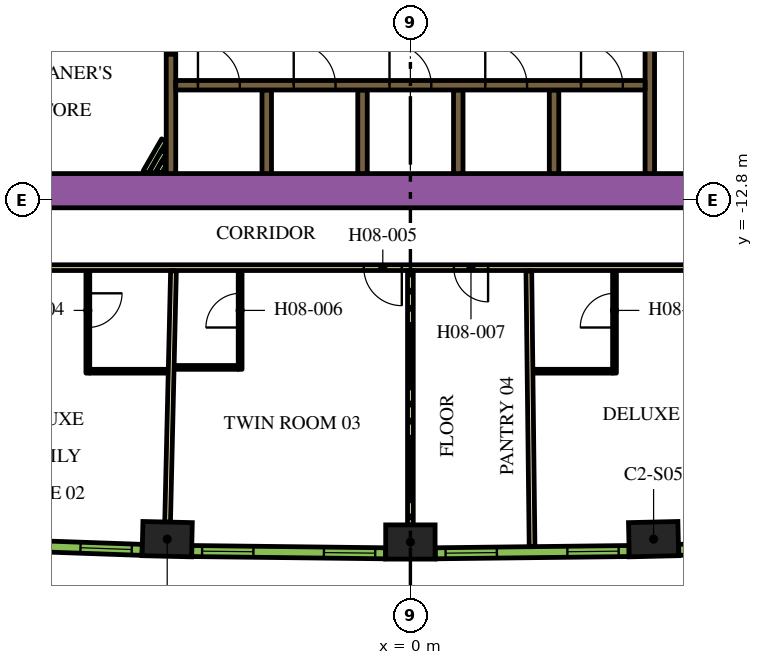
"""IFC4 building model, lengths in metres.
Left out: names, types, materials, properties, quantities, classifications, styles, units other than length and angle.
Written with IfcOpenShell. Run it as: python <this file> out.ifc"""

import sys

from ifc_helpers import new_model, si_unit, direction, frame, frame_2d, origin, origin_2d, place, context, subcontext, project, spatial, rectangle, extrude, element, fill, save


model = new_model("IFC4")
c1 = context("Model", 3, precision=1e-05, world=origin(), true_north=direction((0.0, 1.0)))
c2 = subcontext(c1, "Body", "Model", "MODEL_VIEW")
j1 = project(units=[si_unit("LENGTHUNIT", "METRE"), si_unit("PLANEANGLEUNIT", "RADIAN")], contexts=[c1])
p1 = place(None, origin())
s1 = spatial("IfcSite", under=j1, at=p1, CompositionType="ELEMENT")
p2 = place(p1, origin())
s2 = spatial("IfcBuilding", under=s1, at=p2, CompositionType="ELEMENT")
p3 = place(p2, frame((0.0, 0.0, 107.1)))
s3 = spatial("IfcBuildingStorey", under=s2, at=p3, CompositionType="ELEMENT", Elevation=107.1)
for number, where, z_axis, x_axis in (
    (1, (-6.399, -21.719, 0.0), (0.0, 0.0, 1.0), (1.0, -0.023, 0.0)),
    (2, (0.0, -21.794, 0.0), (0.0, 0.0, 1.0), (1.0, 0.0, 0.0)),
    (3, (6.399, -21.719, 0.0), (0.0, 0.0, 1.0), (1.0, 0.023, 0.0)),
):
    element("IfcColumn", number, at=place(p3, frame(where, z_axis=z_axis, x_axis=x_axis)), inside=s3, PredefinedType="COLUMN", context=c2, shape_type="SweptSolid", body=[
        extrude(rectangle(XDim=1.3, YDim=0.9, at=origin_2d()), origin(), (0.0, 0.0, 1.0), 3.9),
    ])
p4 = place(p3, frame((-12.019, -12.55, 0.0), z_axis=(0.0, 0.0, 1.0), x_axis=(1.0, 0.0, 0.0)))
e4 = element("IfcWall", 4, at=p4, inside=s3, PredefinedType="SOLIDWALL", context=c2, shape_type="SweptSolid", body=[
    extrude(rectangle(XDim=21.63, YDim=0.9, at=frame_2d((10.815, 0.0))), origin(), (0.0, 0.0, 1.0), 3.9),
])
p5 = place(p3, frame((12.84, -9.261, 0.0), z_axis=(0.0, 0.0, 1.0), x_axis=(-0.866013990052, 0.500019768644, 0.0)))
e5 = element("IfcWall", 5, at=p5, inside=s3, PredefinedType="SOLIDWALL", context=c2, shape_type="SweptSolid", body=[
    extrude(rectangle(XDim=6.8, YDim=0.25, at=frame_2d((3.4, 0.0))), origin(), (0.0, 0.0, 1.0), 3.9),
])
p6 = place(p3, frame((-12.84, -9.261, 0.0), z_axis=(0.0, 0.0, 1.0), x_axis=(0.866016039709, 0.500016218704, 0.0)))
e6 = element("IfcWall", 6, at=p6, inside=s3, PredefinedType="SOLIDWALL", context=c2, shape_type="SweptSolid", body=[
    extrude(rectangle(XDim=7.05, YDim=0.25, at=frame_2d((3.525, 0.0))), origin(), (0.0, 0.0, 1.0), 3.9),
])
p7 = place(p3, frame((-3.78, -12.1, 0.0), z_axis=(0.0, 0.0, 1.0), x_axis=(0.0, 1.0, 0.0)))
e7 = element("IfcWall", 7, at=p7, inside=s3, PredefinedType="SOLIDWALL", context=c2, shape_type="SweptSolid", body=[
    extrude(rectangle(XDim=2.2, YDim=0.25, at=frame_2d((1.1, 0.0))), origin(), (0.0, 0.0, 1.0), 3.9),
])
p8 = place(p3, frame((-6.3, -12.1, 0.0), z_axis=(0.0, 0.0, 1.0), x_axis=(0.0, 1.0, 0.0)))
e8 = element("IfcWall", 8, at=p8, inside=s3, PredefinedType="SOLIDWALL", context=c2, shape_type="SweptSolid", body=[
    extrude(rectangle(XDim=3.146, YDim=0.25, at=frame_2d((1.573, 0.0))), origin(), (0.0, 0.0, 1.0), 3.9),
])
p9 = place(p3, frame((6.3, -8.67, 0.0), z_axis=(0.0, 0.0, 1.0), x_axis=(0.0, -1.0, 0.0)))
e9 = element("IfcWall", 9, at=p9, inside=s3, PredefinedType="SOLIDWALL", context=c2, shape_type="SweptSolid", body=[
    extrude(rectangle(XDim=3.43, YDim=0.25, at=frame_2d((1.715, 0.0))), origin(), (0.0, 0.0, 1.0), 3.9),
])
for number, where, z_axis, x_axis in (
    (10, (3.78, -12.1, 0.0), (0.0, 0.0, 1.0), (0.0, 1.0, 0.0)),
    (11, (1.26, -12.1, 0.0), (0.0, 0.0, 1.0), (0.0, 1.0, 0.0)),
    (12, (-1.26, -12.1, 0.0), (0.0, 0.0, 1.0), (0.0, 1.0, 0.0)),
):
    element("IfcWall", number, at=place(p3, frame(where, z_axis=z_axis, x_axis=x_axis)), inside=s3, PredefinedType="SOLIDWALL", context=c2, shape_type="SweptSolid", body=[
        extrude(rectangle(XDim=2.2, YDim=0.25, at=frame_2d((1.1, 0.0))), origin(), (0.0, 0.0, 1.0), 3.9),
    ])
p10 = place(p3, frame((-6.968, -12.068, 0.0), z_axis=(0.0, 0.0, 1.0), x_axis=(0.49998975084, 0.866031321059, 0.0)))
e13 = element("IfcWall", 13, at=p10, inside=s3, PredefinedType="PARTITIONING", context=c2, shape_type="SweptSolid", body=[
    extrude(rectangle(XDim=0.975, YDim=0.15, at=frame_2d((0.488, 0.0))), origin(), (0.0, 0.0, 1.0), 2.75),
])
p11 = place(p3, frame((-6.794, -12.068, 0.0), z_axis=(0.0, 0.0, 1.0), x_axis=(0.49985693963, 0.866107983974, 0.0)))
e14 = element("IfcWall", 14, at=p11, inside=s3, PredefinedType="PARTITIONING", context=c2, shape_type="SweptSolid", body=[
    extrude(rectangle(XDim=0.629, YDim=0.15, at=frame_2d((0.314, 0.0))), origin(), (0.0, 0.0, 1.0), 2.75),
])
p12 = place(p3, frame((-6.621, -12.068, 0.0), z_axis=(0.0, 0.0, 1.0), x_axis=(0.500046963369, 0.865998287773, 0.0)))
e15 = element("IfcWall", 15, at=p12, inside=s3, PredefinedType="PARTITIONING", context=c2, shape_type="SweptSolid", body=[
    extrude(rectangle(XDim=0.282, YDim=0.15, at=frame_2d((0.141, 0.0))), origin(), (0.0, 0.0, 1.0), 2.75),
])
p13 = place(p3, frame((-6.175, -9.775, 0.0), z_axis=(0.0, 0.0, 1.0), x_axis=(1.0, 0.0, 0.0)))
e16 = element("IfcWall", 16, at=p13, inside=s3, PredefinedType="SOLIDWALL", context=c2, shape_type="SweptSolid", body=[
    extrude(rectangle(XDim=12.35, YDim=0.25, at=frame_2d((6.175, 0.0))), origin(), (0.0, 0.0, 1.0), 3.9),
])
p14 = place(p13, frame((0.585, 0.0, 0.0)))
e17 = element("IfcOpeningElement", 17, at=p14, cuts=e16, PredefinedType="OPENING", context=c2, shape_type="SweptSolid", body=[
    extrude(rectangle(XDim=1.1, YDim=2.1, at=frame_2d((0.55, 1.05))), frame((0.0, 0.135, 0.0), z_axis=(0.0, -1.0, 0.0), x_axis=(1.0, 0.0, 0.0)), (0.0, 0.0, 1.0), 0.27),
])
p15 = place(p13, frame((3.105, 0.0, 0.0)))
e18 = element("IfcOpeningElement", 18, at=p15, cuts=e16, PredefinedType="OPENING", context=c2, shape_type="SweptSolid", body=[
    extrude(rectangle(XDim=1.1, YDim=2.1, at=frame_2d((0.55, 1.05))), frame((0.0, 0.135, 0.0), z_axis=(0.0, -1.0, 0.0), x_axis=(1.0, 0.0, 0.0)), (0.0, 0.0, 1.0), 0.27),
])
p16 = place(p13, frame((5.625, 0.0, 0.0)))
e19 = element("IfcOpeningElement", 19, at=p16, cuts=e16, PredefinedType="OPENING", context=c2, shape_type="SweptSolid", body=[
    extrude(rectangle(XDim=1.1, YDim=2.1, at=frame_2d((0.55, 1.05))), frame((0.0, 0.135, 0.0), z_axis=(0.0, -1.0, 0.0), x_axis=(1.0, 0.0, 0.0)), (0.0, 0.0, 1.0), 0.27),
])
p17 = place(p13, frame((8.145, 0.0, 0.0)))
e20 = element("IfcOpeningElement", 20, at=p17, cuts=e16, PredefinedType="OPENING", context=c2, shape_type="SweptSolid", body=[
    extrude(rectangle(XDim=1.1, YDim=2.1, at=frame_2d((0.55, 1.05))), frame((0.0, 0.135, 0.0), z_axis=(0.0, -1.0, 0.0), x_axis=(1.0, 0.0, 0.0)), (0.0, 0.0, 1.0), 0.27),
])
p18 = place(p13, frame((10.665, 0.0, 0.0)))
e21 = element("IfcOpeningElement", 21, at=p18, cuts=e16, PredefinedType="OPENING", context=c2, shape_type="SweptSolid", body=[
    extrude(rectangle(XDim=1.1, YDim=2.1, at=frame_2d((0.55, 1.05))), frame((0.0, 0.135, 0.0), z_axis=(0.0, -1.0, 0.0), x_axis=(1.0, 0.0, 0.0)), (0.0, 0.0, 1.0), 0.27),
])
p19 = place(p3, frame((-6.3, -7.154, 0.0), z_axis=(0.0, 0.0, 1.0), x_axis=(0.0, -1.0, 0.0)))
e22 = element("IfcWall", 22, at=p19, inside=s3, PredefinedType="SOLIDWALL", context=c2, shape_type="SweptSolid", body=[
    extrude(rectangle(XDim=1.8, YDim=0.25, at=frame_2d((0.9, 0.0))), origin(), (0.0, 0.0, 1.0), 3.9),
])
p20 = place(p19, frame((0.45, 0.0, 0.0)))
e23 = element("IfcOpeningElement", 23, at=p20, cuts=e22, PredefinedType="OPENING", context=c2, shape_type="SweptSolid", body=[
    extrude(rectangle(XDim=0.9, YDim=2.1, at=frame_2d((0.45, 1.05))), frame((0.0, 0.135, 0.0), z_axis=(0.0, -1.0, 0.0), x_axis=(1.0, 0.0, 0.0)), (0.0, 0.0, 1.0), 0.27),
])
p21 = place(p3, frame((12.918, -14.575, 0.0), z_axis=(0.0, 0.0, 1.0), x_axis=(-1.0, 0.0, 0.0)))
e24 = element("IfcWall", 24, at=p21, inside=s3, PredefinedType="PARTITIONING", context=c2, shape_type="SweptSolid", body=[
    extrude(rectangle(XDim=25.766, YDim=0.15, at=frame_2d((12.883, 0.0))), origin(), (0.0, 0.0, 1.0), 2.75),
])
p22 = place(p21, frame((24.586, 0.0, 0.0)))
e25 = element("IfcOpeningElement", 25, at=p22, cuts=e24, PredefinedType="OPENING", context=c2, shape_type="SweptSolid", body=[
    extrude(rectangle(XDim=1.0, YDim=2.1, at=frame_2d((0.5, 1.05))), frame((0.0, 0.085, 0.0), z_axis=(0.0, -1.0, 0.0), x_axis=(1.0, 0.0, 0.0)), (0.0, 0.0, 1.0), 0.17),
])
p23 = place(p21, frame((13.144, 0.0, 0.0)))
e26 = element("IfcOpeningElement", 26, at=p23, cuts=e24, PredefinedType="OPENING", context=c2, shape_type="SweptSolid", body=[
    extrude(rectangle(XDim=1.0, YDim=2.1, at=frame_2d((0.5, 1.05))), frame((0.0, 0.085, 0.0), z_axis=(0.0, -1.0, 0.0), x_axis=(1.0, 0.0, 0.0)), (0.0, 0.0, 1.0), 0.17),
])
p24 = place(p21, frame((10.874, 0.0, 0.0)))
e27 = element("IfcOpeningElement", 27, at=p24, cuts=e24, PredefinedType="OPENING", context=c2, shape_type="SweptSolid", body=[
    extrude(rectangle(XDim=0.9, YDim=2.1, at=frame_2d((0.45, 1.05))), frame((0.0, 0.085, 0.0), z_axis=(0.0, -1.0, 0.0), x_axis=(1.0, 0.0, 0.0)), (0.0, 0.0, 1.0), 0.17),
])
p25 = place(p21, frame((0.596, 0.0, 0.0)))
e28 = element("IfcOpeningElement", 28, at=p25, cuts=e24, PredefinedType="OPENING", context=c2, shape_type="SweptSolid", body=[
    extrude(rectangle(XDim=1.0, YDim=2.1, at=frame_2d((0.5, 1.05))), frame((0.0, 0.085, 0.0), z_axis=(0.0, -1.0, 0.0), x_axis=(1.0, 0.0, 0.0)), (0.0, 0.0, 1.0), 0.17),
])
p26 = place(p3, frame((-6.389, -21.269, 0.0), z_axis=(0.0, 0.0, 1.0), x_axis=(0.023377429176, 0.999726710559, 0.0)))
e29 = element("IfcWall", 29, at=p26, inside=s3, PredefinedType="PARTITIONING", context=c2, shape_type="SweptSolid", body=[
    extrude(rectangle(XDim=6.611, YDim=0.15, at=frame_2d((3.305, 0.0))), origin(), (0.0, 0.0, 1.0), 2.75),
])
p27 = place(p3, frame((0.0, -21.344, 0.0), z_axis=(0.0, 0.0, 1.0), x_axis=(0.0, 1.0, 0.0)))
e30 = element("IfcWall", 30, at=p27, inside=s3, PredefinedType="PARTITIONING", context=c2, shape_type="SweptSolid", body=[
    extrude(rectangle(XDim=6.694, YDim=0.15, at=frame_2d((3.347, 0.0))), origin(), (0.0, 0.0, 1.0), 2.75),
])
p28 = place(p3, frame((3.202, -21.916, 0.0), z_axis=(0.0, 0.0, 1.0), x_axis=(-0.011707696285, 0.999931462575, 0.0)))
e31 = element("IfcWall", 31, at=p28, inside=s3, PredefinedType="PARTITIONING", context=c2, shape_type="SweptSolid", body=[
    extrude(rectangle(XDim=7.257, YDim=0.15, at=frame_2d((3.628, 0.0))), origin(), (0.0, 0.0, 1.0), 2.75),
])
p29 = place(p3, frame((-8.488, -14.65, 0.0), z_axis=(0.0, 0.0, 1.0), x_axis=(0.0, -1.0, 0.0)))
e32 = element("IfcWall", 32, at=p29, inside=s3, PredefinedType="PARTITIONING", context=c2, shape_type="SweptSolid", body=[
    extrude(rectangle(XDim=2.7, YDim=0.1, at=frame_2d((1.35, 0.0))), origin(), (0.0, 0.0, 1.0), 2.75),
])
p30 = place(p29, frame((0.6, 0.0, 0.0)))
e33 = element("IfcOpeningElement", 33, at=p30, cuts=e32, PredefinedType="OPENING", context=c2, shape_type="SweptSolid", body=[
    extrude(rectangle(XDim=0.9, YDim=2.1, at=frame_2d((0.45, 1.05))), frame((0.0, 0.06, 0.0), z_axis=(0.0, -1.0, 0.0), x_axis=(1.0, 0.0, 0.0)), (0.0, 0.0, 1.0), 0.12),
])
p31 = place(p3, frame((-8.438, -17.3, 0.0), z_axis=(0.0, 0.0, 1.0), x_axis=(1.0, 0.0, 0.0)))
e34 = element("IfcWall", 34, at=p31, inside=s3, PredefinedType="PARTITIONING", context=c2, shape_type="SweptSolid", body=[
    extrude(rectangle(XDim=2.06, YDim=0.1, at=frame_2d((1.03, 0.0))), origin(), (0.0, 0.0, 1.0), 2.75),
])
p32 = place(p3, frame((-4.48, -17.25, 0.0), z_axis=(0.0, 0.0, 1.0), x_axis=(0.0, 1.0, 0.0)))
e35 = element("IfcWall", 35, at=p32, inside=s3, PredefinedType="PARTITIONING", context=c2, shape_type="SweptSolid", body=[
    extrude(rectangle(XDim=2.6, YDim=0.1, at=frame_2d((1.3, 0.0))), origin(), (0.0, 0.0, 1.0), 2.75),
])
p33 = place(p32, frame((1.1, 0.0, 0.0)))
e36 = element("IfcOpeningElement", 36, at=p33, cuts=e35, PredefinedType="OPENING", context=c2, shape_type="SweptSolid", body=[
    extrude(rectangle(XDim=0.9, YDim=2.1, at=frame_2d((0.45, 1.05))), frame((0.0, 0.06, 0.0), z_axis=(0.0, -1.0, 0.0), x_axis=(1.0, 0.0, 0.0)), (0.0, 0.0, 1.0), 0.12),
])
p34 = place(p3, frame((-4.53, -17.2, 0.0), z_axis=(0.0, 0.0, 1.0), x_axis=(-1.0, 0.0, 0.0)))
e37 = element("IfcWall", 37, at=p34, inside=s3, PredefinedType="PARTITIONING", context=c2, shape_type="SweptSolid", body=[
    extrude(rectangle(XDim=1.68, YDim=0.1, at=frame_2d((0.84, 0.0))), origin(), (0.0, 0.0, 1.0), 2.75),
])
p35 = place(p3, frame((5.371, -17.35, 0.0), z_axis=(0.0, 0.0, 1.0), x_axis=(0.0, 1.0, 0.0)))
e38 = element("IfcWall", 38, at=p35, inside=s3, PredefinedType="PARTITIONING", context=c2, shape_type="SweptSolid", body=[
    extrude(rectangle(XDim=2.7, YDim=0.1, at=frame_2d((1.35, 0.0))), origin(), (0.0, 0.0, 1.0), 2.75),
])
p36 = place(p35, frame((1.2, 0.0, 0.0)))
e39 = element("IfcOpeningElement", 39, at=p36, cuts=e38, PredefinedType="OPENING", context=c2, shape_type="SweptSolid", body=[
    extrude(rectangle(XDim=0.9, YDim=2.1, at=frame_2d((0.45, 1.05))), frame((0.0, 0.06, 0.0), z_axis=(0.0, -1.0, 0.0), x_axis=(1.0, 0.0, 0.0)), (0.0, 0.0, 1.0), 0.12),
])
p37 = place(p3, frame((5.321, -17.3, 0.0), z_axis=(0.0, 0.0, 1.0), x_axis=(-1.0, 0.0, 0.0)))
e40 = element("IfcWall", 40, at=p37, inside=s3, PredefinedType="PARTITIONING", context=c2, shape_type="SweptSolid", body=[
    extrude(rectangle(XDim=2.09, YDim=0.1, at=frame_2d((1.045, 0.0))), origin(), (0.0, 0.0, 1.0), 2.75),
])
p38 = place(p3, frame((-12.157, -21.822, 0.0), z_axis=(0.0, 0.0, 1.0), x_axis=(0.999385993957, -0.035037623812, 0.0)))
e41 = element("IfcWall", 41, at=p38, inside=s3, PredefinedType="SOLIDWALL", context=c2, shape_type="SweptSolid", body=[
    extrude(rectangle(XDim=5.101, YDim=0.29, at=frame_2d((2.55, 0.0))), origin(), (0.0, 0.0, 1.0), 3.65),
])
p39 = place(p38, frame((0.273, 0.0, 0.9)))
e42 = element("IfcOpeningElement", 42, at=p39, cuts=e41, PredefinedType="OPENING", context=c2, shape_type="SweptSolid", body=[
    extrude(rectangle(XDim=1.35, YDim=2.15, at=frame_2d((0.675, 1.075))), frame((0.0, 0.155, 0.0), z_axis=(0.0, -1.0, 0.0), x_axis=(1.0, 0.0, 0.0)), (0.0, 0.0, 1.0), 0.31),
])
p40 = place(p38, frame((3.478, 0.0, 0.9)))
e43 = element("IfcOpeningElement", 43, at=p40, cuts=e41, PredefinedType="OPENING", context=c2, shape_type="SweptSolid", body=[
    extrude(rectangle(XDim=1.35, YDim=2.15, at=frame_2d((0.675, 1.075))), frame((0.0, 0.155, 0.0), z_axis=(0.0, -1.0, 0.0), x_axis=(1.0, 0.0, 0.0)), (0.0, 0.0, 1.0), 0.31),
])
p41 = place(p3, frame((-5.753, -22.031, 0.0), z_axis=(0.0, 0.0, 1.0), x_axis=(0.999931786565, -0.011679992145, 0.0)))
e44 = element("IfcWall", 44, at=p41, inside=s3, PredefinedType="SOLIDWALL", context=c2, shape_type="SweptSolid", body=[
    extrude(rectangle(XDim=5.1, YDim=0.29, at=frame_2d((2.55, 0.0))), origin(), (0.0, 0.0, 1.0), 3.65),
])
p42 = place(p41, frame((0.272, 0.0, 0.9)))
e45 = element("IfcOpeningElement", 45, at=p42, cuts=e44, PredefinedType="OPENING", context=c2, shape_type="SweptSolid", body=[
    extrude(rectangle(XDim=1.35, YDim=2.15, at=frame_2d((0.675, 1.075))), frame((0.0, 0.155, 0.0), z_axis=(0.0, -1.0, 0.0), x_axis=(1.0, 0.0, 0.0)), (0.0, 0.0, 1.0), 0.31),
])
p43 = place(p41, frame((3.478, 0.0, 0.9)))
e46 = element("IfcOpeningElement", 46, at=p43, cuts=e44, PredefinedType="OPENING", context=c2, shape_type="SweptSolid", body=[
    extrude(rectangle(XDim=1.35, YDim=2.15, at=frame_2d((0.675, 1.075))), frame((0.0, 0.155, 0.0), z_axis=(0.0, -1.0, 0.0), x_axis=(1.0, 0.0, 0.0)), (0.0, 0.0, 1.0), 0.31),
])
p44 = place(p3, frame((0.653, -22.091, 0.0), z_axis=(0.0, 0.0, 1.0), x_axis=(0.999931786565, 0.011679992145, 0.0)))
e47 = element("IfcWall", 47, at=p44, inside=s3, PredefinedType="SOLIDWALL", context=c2, shape_type="SweptSolid", body=[
    extrude(rectangle(XDim=5.1, YDim=0.29, at=frame_2d((2.55, 0.0))), origin(), (0.0, 0.0, 1.0), 3.65),
])
p45 = place(p44, frame((0.273, 0.0, 0.9)))
e48 = element("IfcOpeningElement", 48, at=p45, cuts=e47, PredefinedType="OPENING", context=c2, shape_type="SweptSolid", body=[
    extrude(rectangle(XDim=1.35, YDim=2.15, at=frame_2d((0.675, 1.075))), frame((0.0, 0.155, 0.0), z_axis=(0.0, -1.0, 0.0), x_axis=(1.0, 0.0, 0.0)), (0.0, 0.0, 1.0), 0.31),
])
p46 = place(p44, frame((3.478, 0.0, 0.9)))
e49 = element("IfcOpeningElement", 49, at=p46, cuts=e47, PredefinedType="OPENING", context=c2, shape_type="SweptSolid", body=[
    extrude(rectangle(XDim=1.35, YDim=2.15, at=frame_2d((0.675, 1.075))), frame((0.0, 0.155, 0.0), z_axis=(0.0, -1.0, 0.0), x_axis=(1.0, 0.0, 0.0)), (0.0, 0.0, 1.0), 0.31),
])
p47 = place(p3, frame((7.059, -22.001, 0.0), z_axis=(0.0, 0.0, 1.0), x_axis=(0.999385993957, 0.035037623812, 0.0)))
e50 = element("IfcWall", 50, at=p47, inside=s3, PredefinedType="SOLIDWALL", context=c2, shape_type="SweptSolid", body=[
    extrude(rectangle(XDim=5.101, YDim=0.29, at=frame_2d((2.55, 0.0))), origin(), (0.0, 0.0, 1.0), 3.65),
])
p48 = place(p47, frame((0.273, 0.0, 0.9)))
e51 = element("IfcOpeningElement", 51, at=p48, cuts=e50, PredefinedType="OPENING", context=c2, shape_type="SweptSolid", body=[
    extrude(rectangle(XDim=1.35, YDim=2.15, at=frame_2d((0.675, 1.075))), frame((0.0, 0.155, 0.0), z_axis=(0.0, -1.0, 0.0), x_axis=(1.0, 0.0, 0.0)), (0.0, 0.0, 1.0), 0.31),
])
p49 = place(p47, frame((3.478, 0.0, 0.9)))
e52 = element("IfcOpeningElement", 52, at=p49, cuts=e50, PredefinedType="OPENING", context=c2, shape_type="SweptSolid", body=[
    extrude(rectangle(XDim=1.35, YDim=2.15, at=frame_2d((0.675, 1.075))), frame((0.0, 0.155, 0.0), z_axis=(0.0, -1.0, 0.0), x_axis=(1.0, 0.0, 0.0)), (0.0, 0.0, 1.0), 0.31),
])
p50 = place(p14, origin())
e53 = element("IfcDoor", 53, at=p50, inside=s3, OperationType="DOUBLE_DOOR_SLIDING", PredefinedType="DOOR", context=c2, shape_type="SweptSolid", body=[
    extrude(rectangle(XDim=1.1, YDim=2.1, at=frame_2d((0.55, 1.05))), frame((0.0, 0.025, 0.0), z_axis=(0.0, -1.0, 0.0), x_axis=(1.0, 0.0, 0.0)), (0.0, 0.0, 1.0), 0.05),
])
fill(e17, e53)
p51 = place(p15, origin())
e54 = element("IfcDoor", 54, at=p51, inside=s3, OperationType="DOUBLE_DOOR_SLIDING", PredefinedType="DOOR", context=c2, shape_type="SweptSolid", body=[
    extrude(rectangle(XDim=1.1, YDim=2.1, at=frame_2d((0.55, 1.05))), frame((0.0, 0.025, 0.0), z_axis=(0.0, -1.0, 0.0), x_axis=(1.0, 0.0, 0.0)), (0.0, 0.0, 1.0), 0.05),
])
fill(e18, e54)
p52 = place(p16, origin())
e55 = element("IfcDoor", 55, at=p52, inside=s3, OperationType="DOUBLE_DOOR_SLIDING", PredefinedType="DOOR", context=c2, shape_type="SweptSolid", body=[
    extrude(rectangle(XDim=1.1, YDim=2.1, at=frame_2d((0.55, 1.05))), frame((0.0, 0.025, 0.0), z_axis=(0.0, -1.0, 0.0), x_axis=(1.0, 0.0, 0.0)), (0.0, 0.0, 1.0), 0.05),
])
fill(e19, e55)
p53 = place(p17, origin())
e56 = element("IfcDoor", 56, at=p53, inside=s3, OperationType="DOUBLE_DOOR_SLIDING", PredefinedType="DOOR", context=c2, shape_type="SweptSolid", body=[
    extrude(rectangle(XDim=1.1, YDim=2.1, at=frame_2d((0.55, 1.05))), frame((0.0, 0.025, 0.0), z_axis=(0.0, -1.0, 0.0), x_axis=(1.0, 0.0, 0.0)), (0.0, 0.0, 1.0), 0.05),
])
fill(e20, e56)
p54 = place(p18, origin())
e57 = element("IfcDoor", 57, at=p54, inside=s3, OperationType="DOUBLE_DOOR_SLIDING", PredefinedType="DOOR", context=c2, shape_type="SweptSolid", body=[
    extrude(rectangle(XDim=1.1, YDim=2.1, at=frame_2d((0.55, 1.05))), frame((0.0, 0.025, 0.0), z_axis=(0.0, -1.0, 0.0), x_axis=(1.0, 0.0, 0.0)), (0.0, 0.0, 1.0), 0.05),
])
fill(e21, e57)
p55 = place(p30, origin())
e58 = element("IfcDoor", 58, at=p55, inside=s3, OperationType="SINGLE_SWING_LEFT", PredefinedType="DOOR", context=c2, shape_type="SweptSolid", body=[
    extrude(rectangle(XDim=0.9, YDim=2.1, at=frame_2d((0.45, 1.05))), frame((0.0, 0.025, 0.0), z_axis=(0.0, -1.0, 0.0), x_axis=(1.0, 0.0, 0.0)), (0.0, 0.0, 1.0), 0.05),
])
fill(e33, e58)
p56 = place(p23, origin())
e59 = element("IfcDoor", 59, at=p56, inside=s3, OperationType="SINGLE_SWING_LEFT", PredefinedType="DOOR", context=c2, shape_type="SweptSolid", body=[
    extrude(rectangle(XDim=1.0, YDim=2.1, at=frame_2d((0.5, 1.05))), frame((0.0, 0.025, 0.0), z_axis=(0.0, -1.0, 0.0), x_axis=(1.0, 0.0, 0.0)), (0.0, 0.0, 1.0), 0.05),
])
fill(e26, e59)
p57 = place(p33, origin())
e60 = element("IfcDoor", 60, at=p57, inside=s3, OperationType="SINGLE_SWING_RIGHT", PredefinedType="DOOR", context=c2, shape_type="SweptSolid", body=[
    extrude(rectangle(XDim=0.9, YDim=2.1, at=frame_2d((0.45, 1.05))), frame((0.0, 0.025, 0.0), z_axis=(0.0, -1.0, 0.0), x_axis=(1.0, 0.0, 0.0)), (0.0, 0.0, 1.0), 0.05),
])
fill(e36, e60)
p58 = place(p24, origin())
e61 = element("IfcDoor", 61, at=p58, inside=s3, OperationType="SINGLE_SWING_RIGHT", PredefinedType="DOOR", context=c2, shape_type="SweptSolid", body=[
    extrude(rectangle(XDim=0.9, YDim=2.1, at=frame_2d((0.45, 1.05))), frame((0.0, 0.025, 0.0), z_axis=(0.0, -1.0, 0.0), x_axis=(1.0, 0.0, 0.0)), (0.0, 0.0, 1.0), 0.05),
])
fill(e27, e61)
p59 = place(p36, origin())
e62 = element("IfcDoor", 62, at=p59, inside=s3, OperationType="SINGLE_SWING_LEFT", PredefinedType="DOOR", context=c2, shape_type="SweptSolid", body=[
    extrude(rectangle(XDim=0.9, YDim=2.1, at=frame_2d((0.45, 1.05))), frame((0.0, 0.025, 0.0), z_axis=(0.0, -1.0, 0.0), x_axis=(1.0, 0.0, 0.0)), (0.0, 0.0, 1.0), 0.05),
])
fill(e39, e62)
p60 = place(p40, origin())
e63 = element("IfcWindow", 63, at=p60, inside=s3, PartitioningType="DOUBLE_PANEL_VERTICAL", PredefinedType="WINDOW", context=c2, shape_type="SweptSolid", body=[
    extrude(rectangle(XDim=1.35, YDim=2.15, at=frame_2d((0.675, 1.075))), frame((0.0, 0.015, 0.0), z_axis=(0.0, -1.0, 0.0), x_axis=(1.0, 0.0, 0.0)), (0.0, 0.0, 1.0), 0.06),
])
fill(e43, e63)
p61 = place(p42, origin())
e64 = element("IfcWindow", 64, at=p61, inside=s3, PartitioningType="DOUBLE_PANEL_VERTICAL", PredefinedType="WINDOW", context=c2, shape_type="SweptSolid", body=[
    extrude(rectangle(XDim=1.35, YDim=2.15, at=frame_2d((0.675, 1.075))), frame((0.0, 0.015, 0.0), z_axis=(0.0, -1.0, 0.0), x_axis=(1.0, 0.0, 0.0)), (0.0, 0.0, 1.0), 0.06),
])
fill(e45, e64)
p62 = place(p43, origin())
e65 = element("IfcWindow", 65, at=p62, inside=s3, PartitioningType="DOUBLE_PANEL_VERTICAL", PredefinedType="WINDOW", context=c2, shape_type="SweptSolid", body=[
    extrude(rectangle(XDim=1.35, YDim=2.15, at=frame_2d((0.675, 1.075))), frame((0.0, 0.015, 0.0), z_axis=(0.0, -1.0, 0.0), x_axis=(1.0, 0.0, 0.0)), (0.0, 0.0, 1.0), 0.06),
])
fill(e46, e65)
p63 = place(p45, origin())
e66 = element("IfcWindow", 66, at=p63, inside=s3, PartitioningType="DOUBLE_PANEL_VERTICAL", PredefinedType="WINDOW", context=c2, shape_type="SweptSolid", body=[
    extrude(rectangle(XDim=1.35, YDim=2.15, at=frame_2d((0.675, 1.075))), frame((0.0, 0.015, 0.0), z_axis=(0.0, -1.0, 0.0), x_axis=(1.0, 0.0, 0.0)), (0.0, 0.0, 1.0), 0.06),
])
fill(e48, e66)
p64 = place(p46, origin())
e67 = element("IfcWindow", 67, at=p64, inside=s3, PartitioningType="DOUBLE_PANEL_VERTICAL", PredefinedType="WINDOW", context=c2, shape_type="SweptSolid", body=[
    extrude(rectangle(XDim=1.35, YDim=2.15, at=frame_2d((0.675, 1.075))), frame((0.0, 0.015, 0.0), z_axis=(0.0, -1.0, 0.0), x_axis=(1.0, 0.0, 0.0)), (0.0, 0.0, 1.0), 0.06),
])
fill(e49, e67)
save(model, sys.argv[1])
